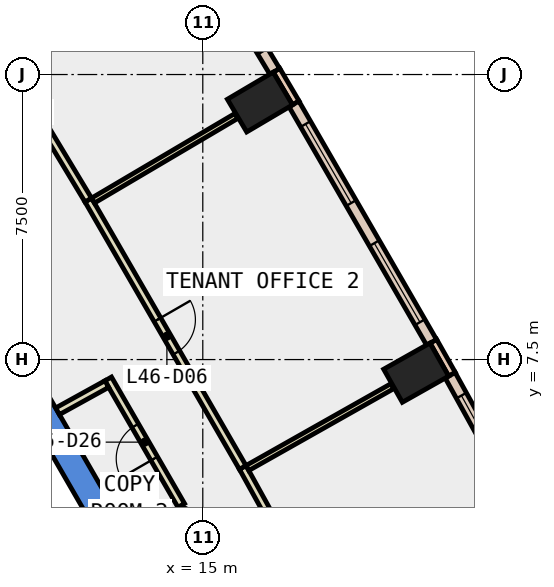
"""IFC4 building model, lengths in metres.
Left out: names, types, materials, properties, quantities, classifications, styles, units other than length and angle.
Written with IfcOpenShell. Run it as: python <this file> out.ifc"""

import sys

from ifc_helpers import new_model, si_unit, direction, frame, frame_2d, origin, origin_2d, place, context, subcontext, project, spatial, polyline, rectangle, outline, extrude, element, fill, save


model = new_model("IFC4")
c1 = context("Model", 3, precision=1e-05, world=origin(), true_north=direction((0.0, 1.0)))
c2 = subcontext(c1, "Body", "Model", "MODEL_VIEW")
j1 = project(units=[si_unit("LENGTHUNIT", "METRE"), si_unit("PLANEANGLEUNIT", "RADIAN")], contexts=[c1])
p1 = place(None, origin())
s1 = spatial("IfcSite", under=j1, at=p1, CompositionType="ELEMENT")
p2 = place(p1, origin())
s2 = spatial("IfcBuilding", under=s1, at=p2, CompositionType="ELEMENT")
p3 = place(p2, frame((0.0, 0.0, 206.6)))
s3 = spatial("IfcBuildingStorey", under=s2, at=p3, CompositionType="ELEMENT", Elevation=206.6)
for number, where, z_axis, x_axis in (
    (1, (20.615, 7.155, -0.4), (0.0, 0.0, 1.0), (-0.491, 0.871, 0.0)),
    (2, (16.504, 14.275, -0.4), (0.0, 0.0, 1.0), (-0.509, 0.861, 0.0)),
):
    element("IfcColumn", number, at=place(p3, frame(where, z_axis=z_axis, x_axis=x_axis)), inside=s3, PredefinedType="COLUMN", context=c2, shape_type="SweptSolid", body=[
        extrude(rectangle(XDim=1.0, YDim=1.4, at=origin_2d()), origin(), (0.0, 0.0, 1.0), 4.2),
    ])
p4 = place(p3, frame((0.0, 0.0, -0.4)))
e3 = element("IfcWall", 3, at=p4, inside=s3, PredefinedType="SHEAR", context=c2, shape_type="SweptSolid", body=[
    extrude(outline(polyline([(8.084, 11.498), (7.478, 11.148), (12.471, 2.5), (13.279, 2.5), (8.084, 11.498)])), origin(), (0.0, 0.0, 1.0), 4.2),
])
p5 = place(p3, frame((21.558, 7.112, 0.0), z_axis=(0.0, 0.0, 1.0), x_axis=(-0.492033129803, 0.870576475202, 0.0)))
e4 = element("IfcWall", 4, at=p5, inside=s3, PredefinedType="STANDARD", context=c2, shape_type="SweptSolid", body=[
    extrude(rectangle(XDim=1.0, YDim=0.2, at=frame_2d((0.5, 0.0))), origin(), (0.0, 0.0, 1.0), 3.8),
])
p6 = place(p3, frame((17.447, 14.252, 0.0), z_axis=(0.0, 0.0, 1.0), x_axis=(-0.508161541526, 0.861261776531, 0.0)))
e5 = element("IfcWall", 5, at=p6, inside=s3, PredefinedType="STANDARD", context=c2, shape_type="SweptSolid", body=[
    extrude(rectangle(XDim=1.0, YDim=0.2, at=frame_2d((0.5, 0.0))), origin(), (0.0, 0.0, 1.0), 3.8),
])
p7 = place(p3, frame((25.01, 0.751, 0.0), z_axis=(0.0, 0.0, 1.0), x_axis=(-0.483590905878, 0.875294142419, 0.0)))
e6 = element("IfcWall", 6, at=p7, inside=s3, PredefinedType="STANDARD", context=c2, shape_type="SweptSolid", body=[
    extrude(rectangle(XDim=7.238, YDim=0.3, at=frame_2d((3.619, 0.0))), origin(), (0.0, 0.0, 1.0), 3.8),
])
p8 = place(p7, frame((0.609, 0.0, 0.9)))
e7 = element("IfcOpeningElement", 7, at=p8, cuts=e6, PredefinedType="OPENING", context=c2, shape_type="SweptSolid", body=[
    extrude(rectangle(XDim=2.4, YDim=2.6, at=frame_2d((1.2, 1.3))), frame((0.0, 0.16, 0.0), z_axis=(0.0, -1.0, 0.0), x_axis=(1.0, 0.0, 0.0)), (0.0, 0.0, 1.0), 0.32),
])
p9 = place(p7, frame((4.228, 0.0, 0.9)))
e8 = element("IfcOpeningElement", 8, at=p9, cuts=e6, PredefinedType="OPENING", context=c2, shape_type="SweptSolid", body=[
    extrude(rectangle(XDim=2.4, YDim=2.6, at=frame_2d((1.2, 1.3))), frame((0.0, 0.16, 0.0), z_axis=(0.0, -1.0, 0.0), x_axis=(1.0, 0.0, 0.0)), (0.0, 0.0, 1.0), 0.32),
])
p10 = place(p3, frame((21.019, 7.955, 0.0), z_axis=(0.0, 0.0, 1.0), x_axis=(-0.500012402131, 0.866018243292, 0.0)))
e9 = element("IfcWall", 9, at=p10, inside=s3, PredefinedType="STANDARD", context=c2, shape_type="SweptSolid", body=[
    extrude(rectangle(XDim=7.24, YDim=0.3, at=frame_2d((3.62, 0.0))), origin(), (0.0, 0.0, 1.0), 3.8),
])
p11 = place(p10, frame((0.61, 0.0, 0.9)))
e10 = element("IfcOpeningElement", 10, at=p11, cuts=e9, PredefinedType="OPENING", context=c2, shape_type="SweptSolid", body=[
    extrude(rectangle(XDim=2.4, YDim=2.6, at=frame_2d((1.2, 1.3))), frame((0.0, 0.16, 0.0), z_axis=(0.0, -1.0, 0.0), x_axis=(1.0, 0.0, 0.0)), (0.0, 0.0, 1.0), 0.32),
])
p12 = place(p10, frame((4.23, 0.0, 0.9)))
e11 = element("IfcOpeningElement", 11, at=p12, cuts=e9, PredefinedType="OPENING", context=c2, shape_type="SweptSolid", body=[
    extrude(rectangle(XDim=2.4, YDim=2.6, at=frame_2d((1.2, 1.3))), frame((0.0, 0.16, 0.0), z_axis=(0.0, -1.0, 0.0), x_axis=(1.0, 0.0, 0.0)), (0.0, 0.0, 1.0), 0.32),
])
p13 = place(p3, frame((16.892, 15.084, 0.0), z_axis=(0.0, 0.0, 1.0), x_axis=(-0.516230553484, 0.856449657394, 0.0)))
e12 = element("IfcWall", 12, at=p13, inside=s3, PredefinedType="STANDARD", context=c2, shape_type="SweptSolid", body=[
    extrude(rectangle(XDim=7.239, YDim=0.3, at=frame_2d((3.62, 0.0))), origin(), (0.0, 0.0, 1.0), 3.8),
])
p14 = place(p13, frame((0.61, 0.0, 0.9)))
e13 = element("IfcOpeningElement", 13, at=p14, cuts=e12, PredefinedType="OPENING", context=c2, shape_type="SweptSolid", body=[
    extrude(rectangle(XDim=2.4, YDim=2.6, at=frame_2d((1.2, 1.3))), frame((0.0, 0.16, 0.0), z_axis=(0.0, -1.0, 0.0), x_axis=(1.0, 0.0, 0.0)), (0.0, 0.0, 1.0), 0.32),
])
p15 = place(p13, frame((4.229, 0.0, 0.9)))
e14 = element("IfcOpeningElement", 14, at=p15, cuts=e12, PredefinedType="OPENING", context=c2, shape_type="SweptSolid", body=[
    extrude(rectangle(XDim=2.4, YDim=2.6, at=frame_2d((1.2, 1.3))), frame((0.0, 0.16, 0.0), z_axis=(0.0, -1.0, 0.0), x_axis=(1.0, 0.0, 0.0)), (0.0, 0.0, 1.0), 0.32),
])
p16 = place(p3, frame((14.433, 3.663, 0.0), z_axis=(0.0, 0.0, 1.0), x_axis=(-0.500149526678, 0.865939057303, 0.0)))
e15 = element("IfcWall", 15, at=p16, inside=s3, PredefinedType="PARTITIONING", context=c2, shape_type="SweptSolid", body=[
    extrude(rectangle(XDim=3.843, YDim=0.2, at=frame_2d((1.921, 0.0))), origin(), (0.0, 0.0, 1.0), 3.8),
])
p17 = place(p16, frame((1.422, 0.0, 0.0)))
e16 = element("IfcOpeningElement", 16, at=p17, cuts=e15, PredefinedType="OPENING", context=c2, shape_type="SweptSolid", body=[
    extrude(rectangle(XDim=1.0, YDim=2.1, at=frame_2d((0.5, 1.05))), frame((0.0, 0.11, 0.0), z_axis=(0.0, -1.0, 0.0), x_axis=(1.0, 0.0, 0.0)), (0.0, 0.0, 1.0), 0.22),
])
p18 = place(p3, frame((12.474, 6.856, 0.0), z_axis=(0.0, 0.0, 1.0), x_axis=(-0.875305814696, -0.483569778584, 0.0)))
e17 = element("IfcWall", 17, at=p18, inside=s3, PredefinedType="PARTITIONING", context=c2, shape_type="SweptSolid", body=[
    extrude(rectangle(XDim=1.481, YDim=0.2, at=frame_2d((0.74, 0.0))), origin(), (0.0, 0.0, 1.0), 3.8),
])
p19 = place(p3, frame((16.051, 4.663, 0.0), z_axis=(0.0, 0.0, 1.0), x_axis=(0.483513440344, -0.875336936846, 0.0)))
e18 = element("IfcWall", 18, at=p19, inside=s3, PredefinedType="PARTITIONING", context=c2, shape_type="SweptSolid", body=[
    extrude(rectangle(XDim=8.124, YDim=0.2, at=frame_2d((4.062, 0.0))), origin(), (0.0, 0.0, 1.0), 3.8),
])
p20 = place(p19, frame((3.637, 0.0, 0.0)))
e19 = element("IfcOpeningElement", 19, at=p20, cuts=e18, PredefinedType="OPENING", context=c2, shape_type="SweptSolid", body=[
    extrude(rectangle(XDim=1.0, YDim=2.1, at=frame_2d((0.5, 1.05))), frame((0.0, 0.11, 0.0), z_axis=(0.0, -1.0, 0.0), x_axis=(1.0, 0.0, 0.0)), (0.0, 0.0, 1.0), 0.22),
])
p21 = place(p3, frame((11.987, 11.698, 0.0), z_axis=(0.0, 0.0, 1.0), x_axis=(0.500075329254, -0.865981908051, 0.0)))
e20 = element("IfcWall", 20, at=p21, inside=s3, PredefinedType="PARTITIONING", context=c2, shape_type="SweptSolid", body=[
    extrude(rectangle(XDim=8.125, YDim=0.2, at=frame_2d((4.062, 0.0))), origin(), (0.0, 0.0, 1.0), 3.8),
])
p22 = place(p21, frame((3.637, 0.0, 0.0)))
e21 = element("IfcOpeningElement", 21, at=p22, cuts=e20, PredefinedType="OPENING", context=c2, shape_type="SweptSolid", body=[
    extrude(rectangle(XDim=1.0, YDim=2.1, at=frame_2d((0.5, 1.05))), frame((0.0, 0.11, 0.0), z_axis=(0.0, -1.0, 0.0), x_axis=(1.0, 0.0, 0.0)), (0.0, 0.0, 1.0), 0.22),
])
p23 = place(p3, frame((7.792, 18.655, 0.0), z_axis=(0.0, 0.0, 1.0), x_axis=(0.516293428925, -0.856411755669, 0.0)))
e22 = element("IfcWall", 22, at=p23, inside=s3, PredefinedType="PARTITIONING", context=c2, shape_type="SweptSolid", body=[
    extrude(rectangle(XDim=8.124, YDim=0.2, at=frame_2d((4.062, 0.0))), origin(), (0.0, 0.0, 1.0), 3.8),
])
p24 = place(p23, frame((3.637, 0.0, 0.0)))
e23 = element("IfcOpeningElement", 23, at=p24, cuts=e22, PredefinedType="OPENING", context=c2, shape_type="SweptSolid", body=[
    extrude(rectangle(XDim=1.0, YDim=2.1, at=frame_2d((0.5, 1.05))), frame((0.0, 0.11, 0.0), z_axis=(0.0, -1.0, 0.0), x_axis=(1.0, 0.0, 0.0)), (0.0, 0.0, 1.0), 0.22),
])
p25 = place(p3, frame((16.174, 4.646, 0.0), z_axis=(0.0, 0.0, 1.0), x_axis=(0.870725770229, 0.491768881752, 0.0)))
e24 = element("IfcWall", 24, at=p25, inside=s3, PredefinedType="PARTITIONING", context=c2, shape_type="SweptSolid", body=[
    extrude(rectangle(XDim=4.38, YDim=0.15, at=frame_2d((2.19, 0.0))), origin(), (0.0, 0.0, 1.0), 3.8),
])
p26 = place(p3, frame((12.111, 11.684, 0.0), z_axis=(0.0, 0.0, 1.0), x_axis=(0.861290233547, 0.508113307833, 0.0)))
e25 = element("IfcWall", 25, at=p26, inside=s3, PredefinedType="PARTITIONING", context=c2, shape_type="SweptSolid", body=[
    extrude(rectangle(XDim=4.381, YDim=0.15, at=frame_2d((2.19, 0.0))), origin(), (0.0, 0.0, 1.0), 3.8),
])
p27 = place(p3, frame((9.597, -5.079, 0.0), z_axis=(0.0, 0.0, 1.0), x_axis=(0.499962477963, 0.866047066059, 0.0)))
e26 = element("IfcWall", 26, at=p27, inside=s3, PredefinedType="PARTITIONING", context=c2, shape_type="SweptSolid", body=[
    extrude(rectangle(XDim=9.979, YDim=0.15, at=frame_2d((4.989, 0.0))), origin(), (0.0, 0.0, 1.0), 3.8),
])
p28 = place(p9, origin())
e27 = element("IfcWindow", 27, at=p28, inside=s3, PartitioningType="SINGLE_PANEL", PredefinedType="WINDOW", context=c2, shape_type="SweptSolid", body=[
    extrude(rectangle(XDim=2.4, YDim=2.6, at=frame_2d((1.2, 1.3))), frame((0.0, 0.03, 0.0), z_axis=(0.0, -1.0, 0.0), x_axis=(1.0, 0.0, 0.0)), (0.0, 0.0, 1.0), 0.06),
])
fill(e8, e27)
p29 = place(p11, origin())
e28 = element("IfcWindow", 28, at=p29, inside=s3, PartitioningType="SINGLE_PANEL", PredefinedType="WINDOW", context=c2, shape_type="SweptSolid", body=[
    extrude(rectangle(XDim=2.4, YDim=2.6, at=frame_2d((1.2, 1.3))), frame((0.0, 0.03, 0.0), z_axis=(0.0, -1.0, 0.0), x_axis=(1.0, 0.0, 0.0)), (0.0, 0.0, 1.0), 0.06),
])
fill(e10, e28)
p30 = place(p12, origin())
e29 = element("IfcWindow", 29, at=p30, inside=s3, PartitioningType="SINGLE_PANEL", PredefinedType="WINDOW", context=c2, shape_type="SweptSolid", body=[
    extrude(rectangle(XDim=2.4, YDim=2.6, at=frame_2d((1.2, 1.3))), frame((0.0, 0.03, 0.0), z_axis=(0.0, -1.0, 0.0), x_axis=(1.0, 0.0, 0.0)), (0.0, 0.0, 1.0), 0.06),
])
fill(e11, e29)
p31 = place(p22, origin())
e30 = element("IfcDoor", 30, at=p31, inside=s3, OperationType="SINGLE_SWING_RIGHT", PredefinedType="DOOR", context=c2, shape_type="SweptSolid", body=[
    extrude(rectangle(XDim=1.0, YDim=2.1, at=frame_2d((0.5, 1.05))), frame((0.0, 0.025, 0.0), z_axis=(0.0, -1.0, 0.0), x_axis=(1.0, 0.0, 0.0)), (0.0, 0.0, 1.0), 0.05),
])
fill(e21, e30)
p32 = place(p17, origin())
e31 = element("IfcDoor", 31, at=p32, inside=s3, OperationType="SINGLE_SWING_RIGHT", PredefinedType="DOOR", context=c2, shape_type="SweptSolid", body=[
    extrude(rectangle(XDim=1.0, YDim=2.1, at=frame_2d((0.5, 1.05))), frame((0.0, 0.025, 0.0), z_axis=(0.0, -1.0, 0.0), x_axis=(1.0, 0.0, 0.0)), (0.0, 0.0, 1.0), 0.05),
])
fill(e16, e31)
save(model, sys.argv[1])
